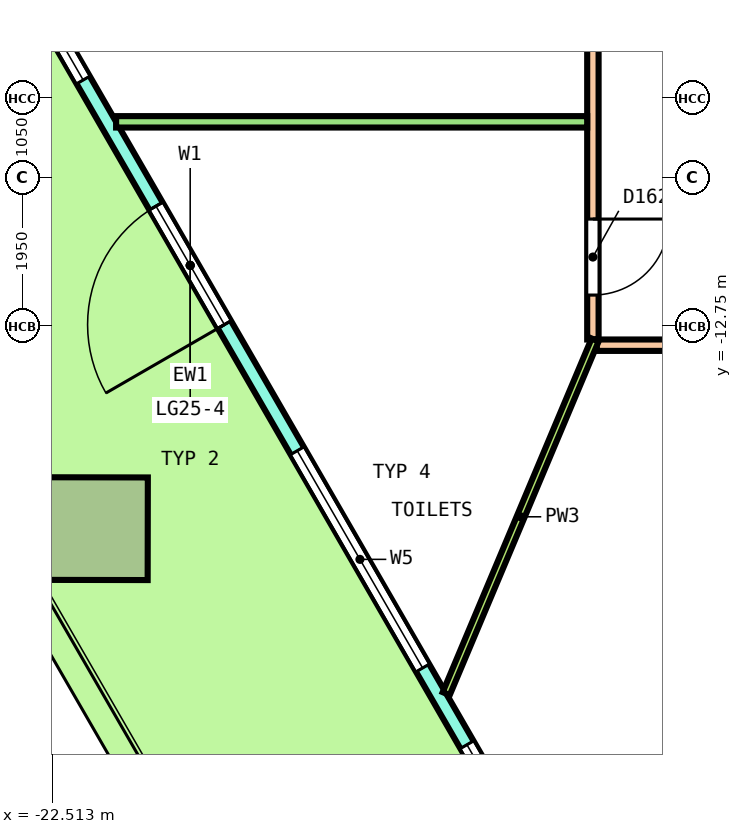
"""IFC4 building model, lengths in metres.
Left out: names, types, materials, properties, quantities, classifications, styles, units other than length and angle.
Written with IfcOpenShell. Run it as: python <this file> out.ifc"""

import sys

from ifc_helpers import new_model, si_unit, direction, frame, frame_2d, origin, origin_2d, place, context, subcontext, project, spatial, polyline, rectangle, outline, extrude, element, fill, save


model = new_model("IFC4")
c1 = context("Model", 3, precision=1e-05, world=origin(), true_north=direction((0.0, 1.0)))
c2 = subcontext(c1, "Body", "Model", "MODEL_VIEW")
j1 = project(units=[si_unit("LENGTHUNIT", "METRE"), si_unit("PLANEANGLEUNIT", "RADIAN")], contexts=[c1])
p1 = place(None, origin())
s1 = spatial("IfcSite", under=j1, at=p1, CompositionType="ELEMENT")
p2 = place(p1, origin())
s2 = spatial("IfcBuilding", under=s1, at=p2, CompositionType="ELEMENT")
p3 = place(p2, frame((0.0, 0.0, 117.6)))
s3 = spatial("IfcBuildingStorey", under=s2, at=p3, CompositionType="ELEMENT", Elevation=117.6)
p4 = place(p3, frame((-21.931, -15.414, 0.0), z_axis=(0.003616977835, -0.006269428248, 0.999973805527), x_axis=(0.498177151135, -0.867045061108, -0.007237962107)))
e1 = element("IfcColumn", 1, at=p4, inside=s3, PredefinedType="COLUMN", context=c2, shape_type="SweptSolid", body=[
    extrude(rectangle(XDim=1.35, YDim=1.35, at=origin_2d()), origin(), (0.0, 0.0, 1.0), 4.05),
])
p5 = place(p3, frame((-26.281, -2.281, 0.0), z_axis=(0.0, 0.0, 1.0), x_axis=(0.500000698452, -0.866025000533, 0.0)))
e2 = element("IfcWall", 2, at=p5, inside=s3, PredefinedType="SOLIDWALL", context=c2, shape_type="SweptSolid", body=[
    extrude(outline(polyline([(-0.027, -0.1), (0.99, -0.1), (2.008, -0.1), (3.025, -0.1), (4.043, -0.1), (5.06, -0.1), (6.078, -0.1), (7.095, -0.1), (8.113, -0.1), (9.13, -0.1), (10.148, -0.1), (11.165, -0.1), (12.182, -0.1), (13.2, -0.1), (14.217, -0.1), (15.235, -0.1), (16.252, -0.1), (17.27, -0.1), (18.287, -0.1), (19.305, -0.1), (20.322, -0.1), (21.34, -0.1), (22.357, -0.1), (22.303, 0.1), (21.291, 0.1), (20.278, 0.1), (19.266, 0.1), (18.253, 0.1), (17.24, 0.1), (16.228, 0.1), (15.215, 0.1), (14.203, 0.1), (13.19, 0.1), (12.177, 0.1), (11.165, 0.1), (10.153, 0.1), (9.14, 0.1), (8.127, 0.1), (7.115, 0.1), (6.102, 0.1), (5.09, 0.1), (4.077, 0.1), (3.064, 0.1), (2.052, 0.1), (1.039, 0.1), (0.027, 0.1), (-0.027, -0.1)])), origin(), (0.0, 0.0, 1.0), 4.1),
])
p6 = place(p5, frame((0.583, 0.0, 0.1)))
e3 = element("IfcOpeningElement", 3, at=p6, cuts=e2, PredefinedType="OPENING", context=c2, shape_type="SweptSolid", body=[
    extrude(rectangle(XDim=3.3, YDim=2.9, at=frame_2d((1.65, 1.45))), frame((0.0, 0.11, 0.0), z_axis=(0.0, -1.0, 0.0), x_axis=(1.0, 0.0, 0.0)), (0.0, 0.0, 1.0), 0.22),
])
p7 = place(p5, frame((5.049, 0.0, 0.1)))
e4 = element("IfcOpeningElement", 4, at=p7, cuts=e2, PredefinedType="OPENING", context=c2, shape_type="SweptSolid", body=[
    extrude(rectangle(XDim=3.3, YDim=2.9, at=frame_2d((1.65, 1.45))), frame((0.0, 0.11, 0.0), z_axis=(0.0, -1.0, 0.0), x_axis=(1.0, 0.0, 0.0)), (0.0, 0.0, 1.0), 0.22),
])
p8 = place(p5, frame((10.265, 0.0, 0.0)))
e5 = element("IfcOpeningElement", 5, at=p8, cuts=e2, PredefinedType="OPENING", context=c2, shape_type="SweptSolid", body=[
    extrude(rectangle(XDim=1.8, YDim=2.4, at=frame_2d((0.9, 1.2))), frame((0.0, 0.11, 0.0), z_axis=(0.0, -1.0, 0.0), x_axis=(1.0, 0.0, 0.0)), (0.0, 0.0, 1.0), 0.22),
])
p9 = place(p5, frame((10.265, 0.0, 2.55)))
e6 = element("IfcOpeningElement", 6, at=p9, cuts=e2, PredefinedType="OPENING", context=c2, shape_type="SweptSolid", body=[
    extrude(rectangle(XDim=1.8, YDim=0.45, at=frame_2d((0.9, 0.225))), frame((0.0, 0.11, 0.0), z_axis=(0.0, -1.0, 0.0), x_axis=(1.0, 0.0, 0.0)), (0.0, 0.0, 1.0), 0.22),
])
p10 = place(p5, frame((13.981, 0.0, 0.1)))
e7 = element("IfcOpeningElement", 7, at=p10, cuts=e2, PredefinedType="OPENING", context=c2, shape_type="SweptSolid", body=[
    extrude(rectangle(XDim=3.3, YDim=2.9, at=frame_2d((1.65, 1.45))), frame((0.0, 0.11, 0.0), z_axis=(0.0, -1.0, 0.0), x_axis=(1.0, 0.0, 0.0)), (0.0, 0.0, 1.0), 0.22),
])
p11 = place(p5, frame((18.447, 0.0, 0.1)))
e8 = element("IfcOpeningElement", 8, at=p11, cuts=e2, PredefinedType="OPENING", context=c2, shape_type="SweptSolid", body=[
    extrude(rectangle(XDim=3.3, YDim=2.9, at=frame_2d((1.65, 1.45))), frame((0.0, 0.11, 0.0), z_axis=(0.0, -1.0, 0.0), x_axis=(1.0, 0.0, 0.0)), (0.0, 0.0, 1.0), 0.22),
])
p12 = place(p3, frame((-15.4, -12.925, 0.0), z_axis=(0.0, 0.0, 1.0), x_axis=(0.0, 1.0, 0.0)))
e9 = element("IfcWall", 9, at=p12, inside=s3, PredefinedType="PARTITIONING", context=c2, shape_type="SweptSolid", body=[
    extrude(rectangle(XDim=11.425, YDim=0.15, at=frame_2d((5.712, 0.0))), origin(), (0.0, 0.0, 1.0), 3.05),
])
p13 = place(p12, frame((0.585, 0.0, 0.0)))
e10 = element("IfcOpeningElement", 10, at=p13, cuts=e9, PredefinedType="OPENING", context=c2, shape_type="SweptSolid", body=[
    extrude(rectangle(XDim=1.0, YDim=2.1, at=frame_2d((0.5, 1.05))), frame((0.0, 0.085, 0.0), z_axis=(0.0, -1.0, 0.0), x_axis=(1.0, 0.0, 0.0)), (0.0, 0.0, 1.0), 0.17),
])
p14 = place(p3, frame((-15.35, -13.0, 0.0), z_axis=(0.0, 0.0, 1.0), x_axis=(1.0, 0.0, 0.0)))
e11 = element("IfcWall", 11, at=p14, inside=s3, PredefinedType="PARTITIONING", context=c2, shape_type="SweptSolid", body=[
    extrude(rectangle(XDim=30.675, YDim=0.15, at=frame_2d((15.337, 0.0))), origin(), (0.0, 0.0, 1.0), 3.05),
])
p15 = place(p14, frame((1.434, 0.0, 0.0)))
e12 = element("IfcOpeningElement", 12, at=p15, cuts=e11, PredefinedType="OPENING", context=c2, shape_type="SweptSolid", body=[
    extrude(rectangle(XDim=1.0, YDim=2.1, at=frame_2d((0.5, 1.05))), frame((0.0, 0.085, 0.0), z_axis=(0.0, -1.0, 0.0), x_axis=(1.0, 0.0, 0.0)), (0.0, 0.0, 1.0), 0.17),
])
p16 = place(p14, frame((5.183, 0.0, 0.0)))
e13 = element("IfcOpeningElement", 13, at=p16, cuts=e11, PredefinedType="OPENING", context=c2, shape_type="SweptSolid", body=[
    extrude(rectangle(XDim=1.2, YDim=2.1, at=frame_2d((0.6, 1.05))), frame((0.0, 0.085, 0.0), z_axis=(0.0, -1.0, 0.0), x_axis=(1.0, 0.0, 0.0)), (0.0, 0.0, 1.0), 0.17),
])
p17 = place(p14, frame((17.031, 0.0, 0.0)))
e14 = element("IfcOpeningElement", 14, at=p17, cuts=e11, PredefinedType="OPENING", context=c2, shape_type="SweptSolid", body=[
    extrude(rectangle(XDim=1.2, YDim=2.1, at=frame_2d((0.6, 1.05))), frame((0.0, 0.085, 0.0), z_axis=(0.0, -1.0, 0.0), x_axis=(1.0, 0.0, 0.0)), (0.0, 0.0, 1.0), 0.17),
])
p18 = place(p14, frame((26.405, 0.0, 0.0)))
e15 = element("IfcOpeningElement", 15, at=p18, cuts=e11, PredefinedType="OPENING", context=c2, shape_type="SweptSolid", body=[
    extrude(rectangle(XDim=1.2, YDim=2.1, at=frame_2d((0.6, 1.05))), frame((0.0, 0.085, 0.0), z_axis=(0.0, -1.0, 0.0), x_axis=(1.0, 0.0, 0.0)), (0.0, 0.0, 1.0), 0.17),
])
p19 = place(p3, frame((-21.673, -10.062, 0.0), z_axis=(0.0, 0.0, 1.0), x_axis=(1.0, 0.0, 0.0)))
e16 = element("IfcWall", 16, at=p19, inside=s3, PredefinedType="PARTITIONING", context=c2, shape_type="SweptSolid", body=[
    extrude(rectangle(XDim=6.198, YDim=0.15, at=frame_2d((3.099, 0.0))), origin(), (0.0, 0.0, 1.0), 3.05),
])
p20 = place(p3, frame((-17.33, -17.584, 0.0), z_axis=(0.0, 0.0, 1.0), x_axis=(0.387981331709, 0.921667231839, 0.0)))
e17 = element("IfcWall", 17, at=p20, inside=s3, PredefinedType="PARTITIONING", context=c2, shape_type="SweptSolid", body=[
    extrude(rectangle(XDim=5.049, YDim=0.1, at=frame_2d((2.524, 0.0))), origin(), (0.0, 0.0, 1.0), 3.05),
])
p21 = place(p7, origin())
e18 = element("IfcWindow", 18, at=p21, inside=s3, PartitioningType="SINGLE_PANEL", PredefinedType="WINDOW", context=c2, shape_type="SweptSolid", body=[
    extrude(rectangle(XDim=3.3, YDim=2.9, at=frame_2d((1.65, 1.45))), frame((0.0, 0.03, 0.0), z_axis=(0.0, -1.0, 0.0), x_axis=(1.0, 0.0, 0.0)), (0.0, 0.0, 1.0), 0.06),
])
fill(e4, e18)
p22 = place(p8, origin())
e19 = element("IfcDoor", 19, at=p22, inside=s3, OperationType="DOUBLE_DOOR_SINGLE_SWING", PredefinedType="DOOR", context=c2, shape_type="SweptSolid", body=[
    extrude(rectangle(XDim=1.8, YDim=2.4, at=frame_2d((0.9, 1.2))), frame((0.0, 0.025, 0.0), z_axis=(0.0, -1.0, 0.0), x_axis=(1.0, 0.0, 0.0)), (0.0, 0.0, 1.0), 0.05),
])
fill(e5, e19)
p23 = place(p9, origin())
e20 = element("IfcWindow", 20, at=p23, inside=s3, PartitioningType="SINGLE_PANEL", PredefinedType="WINDOW", context=c2, shape_type="SweptSolid", body=[
    extrude(rectangle(XDim=1.8, YDim=0.45, at=frame_2d((0.9, 0.225))), frame((0.0, 0.03, 0.0), z_axis=(0.0, -1.0, 0.0), x_axis=(1.0, 0.0, 0.0)), (0.0, 0.0, 1.0), 0.06),
])
fill(e6, e20)
p24 = place(p10, origin())
e21 = element("IfcWindow", 21, at=p24, inside=s3, PartitioningType="SINGLE_PANEL", PredefinedType="WINDOW", context=c2, shape_type="SweptSolid", body=[
    extrude(rectangle(XDim=3.3, YDim=2.9, at=frame_2d((1.65, 1.45))), frame((0.0, 0.03, 0.0), z_axis=(0.0, -1.0, 0.0), x_axis=(1.0, 0.0, 0.0)), (0.0, 0.0, 1.0), 0.06),
])
fill(e7, e21)
p25 = place(p11, origin())
e22 = element("IfcWindow", 22, at=p25, inside=s3, PartitioningType="SINGLE_PANEL", PredefinedType="WINDOW", context=c2, shape_type="SweptSolid", body=[
    extrude(rectangle(XDim=3.3, YDim=2.9, at=frame_2d((1.65, 1.45))), frame((0.0, 0.03, 0.0), z_axis=(0.0, -1.0, 0.0), x_axis=(1.0, 0.0, 0.0)), (0.0, 0.0, 1.0), 0.06),
])
fill(e8, e22)
p26 = place(p13, origin())
e23 = element("IfcDoor", 23, at=p26, inside=s3, OperationType="SINGLE_SWING_LEFT", PredefinedType="DOOR", context=c2, shape_type="SweptSolid", body=[
    extrude(rectangle(XDim=1.0, YDim=2.1, at=frame_2d((0.5, 1.05))), frame((0.0, 0.025, 0.0), z_axis=(0.0, -1.0, 0.0), x_axis=(1.0, 0.0, 0.0)), (0.0, 0.0, 1.0), 0.05),
])
fill(e10, e23)
save(model, sys.argv[1])
